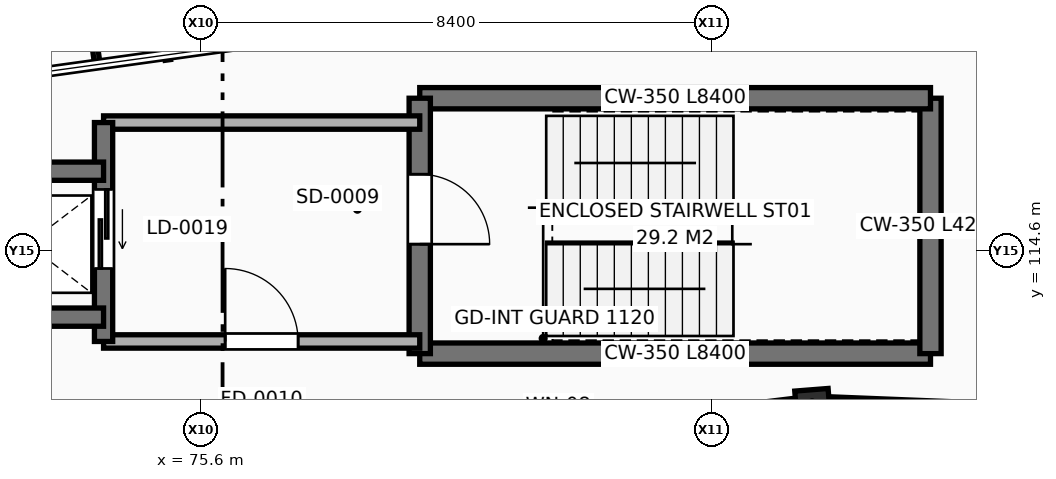
"""IFC4 building model, lengths in metres.
Left out: names, types, materials, properties, quantities, classifications, styles, units other than length and angle.
Written with IfcOpenShell. Run it as: python <this file> out.ifc"""

import sys

from ifc_helpers import new_model, si_unit, direction, frame, frame_2d, origin, origin_2d, place, context, subcontext, project, spatial, rectangle, extrude, element, fill, save


model = new_model("IFC4")
c1 = context("Model", 3, precision=1e-05, world=origin(), true_north=direction((0.0, 1.0)))
c2 = subcontext(c1, "Body", "Model", "MODEL_VIEW")
j1 = project(units=[si_unit("LENGTHUNIT", "METRE"), si_unit("PLANEANGLEUNIT", "RADIAN")], contexts=[c1])
p1 = place(None, origin())
s1 = spatial("IfcSite", under=j1, at=p1, CompositionType="ELEMENT")
p2 = place(p1, origin())
s2 = spatial("IfcBuilding", under=s1, at=p2, CompositionType="ELEMENT")
p3 = place(p2, frame((0.0, 0.0, 18.0)))
s3 = spatial("IfcBuildingStorey", under=s2, at=p3, CompositionType="ELEMENT", Elevation=18.0)
p4 = place(p3, frame((85.664, 112.031, 0.0), z_axis=(0.0, 0.0, 1.0), x_axis=(-0.078459095728, 0.996917333733, 0.0)))
e1 = element("IfcColumn", 1, at=p4, inside=s3, PredefinedType="COLUMN", context=c2, shape_type="SweptSolid", body=[
    extrude(rectangle(XDim=0.55, YDim=0.55, at=origin_2d()), origin(), (0.0, 0.0, 1.0), 4.2),
])
p5 = place(p3, frame((99.0, 111.497, 0.0), z_axis=(0.0, 0.0, 1.0), x_axis=(-0.999197725269, 0.040048792968, 0.0)))
e2 = element("IfcWall", 2, at=p5, inside=s3, PredefinedType="SOLIDWALL", context=c2, shape_type="SweptSolid", body=[
    extrude(rectangle(XDim=13.04, YDim=0.34, at=frame_2d((6.52, 0.0))), origin(), (0.0, 0.0, 1.0), 3.387),
])
p6 = place(p5, frame((2.88, 0.0, 0.9)))
e3 = element("IfcOpeningElement", 3, at=p6, cuts=e2, PredefinedType="OPENING", context=c2, shape_type="SweptSolid", body=[
    extrude(rectangle(XDim=2.2, YDim=2.1, at=frame_2d((1.1, 1.05))), frame((0.0, 0.18, 0.0), z_axis=(0.0, -1.0, 0.0), x_axis=(1.0, 0.0, 0.0)), (0.0, 0.0, 1.0), 0.36),
])
p7 = place(p5, frame((7.96, 0.0, 0.9)))
e4 = element("IfcOpeningElement", 4, at=p7, cuts=e2, PredefinedType="OPENING", context=c2, shape_type="SweptSolid", body=[
    extrude(rectangle(XDim=2.2, YDim=2.1, at=frame_2d((1.1, 1.05))), frame((0.0, 0.18, 0.0), z_axis=(0.0, -1.0, 0.0), x_axis=(1.0, 0.0, 0.0)), (0.0, 0.0, 1.0), 0.36),
])
p8 = place(p3, frame((85.377, 111.996, 0.0), z_axis=(0.0, 0.0, 1.0), x_axis=(-0.992611500808, -0.12133593229, 0.0)))
e5 = element("IfcWall", 5, at=p8, inside=s3, PredefinedType="SOLIDWALL", context=c2, shape_type="SweptSolid", body=[
    extrude(rectangle(XDim=12.795, YDim=0.34, at=frame_2d((6.397, 0.0))), origin(), (0.0, 0.0, 1.0), 3.387),
])
p9 = place(p8, frame((2.665, 0.0, 0.9)))
e6 = element("IfcOpeningElement", 6, at=p9, cuts=e5, PredefinedType="OPENING", context=c2, shape_type="SweptSolid", body=[
    extrude(rectangle(XDim=2.4, YDim=2.1, at=frame_2d((1.2, 1.05))), frame((0.0, 0.18, 0.0), z_axis=(0.0, -1.0, 0.0), x_axis=(1.0, 0.0, 0.0)), (0.0, 0.0, 1.0), 0.36),
])
p10 = place(p8, frame((7.73, 0.0, 0.9)))
e7 = element("IfcOpeningElement", 7, at=p10, cuts=e5, PredefinedType="OPENING", context=c2, shape_type="SweptSolid", body=[
    extrude(rectangle(XDim=2.4, YDim=2.1, at=frame_2d((1.2, 1.05))), frame((0.0, 0.18, 0.0), z_axis=(0.0, -1.0, 0.0), x_axis=(1.0, 0.0, 0.0)), (0.0, 0.0, 1.0), 0.36),
])
p11 = place(p3, frame((79.2, 112.9, 0.0), z_axis=(0.0, 0.0, 1.0), x_axis=(1.0, 0.0, 0.0)))
e8 = element("IfcWall", 8, at=p11, inside=s3, PredefinedType="SHEAR", context=c2, shape_type="SweptSolid", body=[
    extrude(rectangle(XDim=8.4, YDim=0.35, at=frame_2d((4.2, 0.0))), origin(), (0.0, 0.0, 1.0), 3.92),
])
p12 = place(p3, frame((87.6, 112.9, 0.0), z_axis=(0.0, 0.0, 1.0), x_axis=(0.0, 1.0, 0.0)))
e9 = element("IfcWall", 9, at=p12, inside=s3, PredefinedType="SHEAR", context=c2, shape_type="SweptSolid", body=[
    extrude(rectangle(XDim=4.2, YDim=0.35, at=frame_2d((2.1, 0.0))), origin(), (0.0, 0.0, 1.0), 3.92),
])
p13 = place(p3, frame((87.6, 117.1, 0.0), z_axis=(0.0, 0.0, 1.0), x_axis=(-1.0, 0.0, 0.0)))
e10 = element("IfcWall", 10, at=p13, inside=s3, PredefinedType="SHEAR", context=c2, shape_type="SweptSolid", body=[
    extrude(rectangle(XDim=8.4, YDim=0.35, at=frame_2d((4.2, 0.0))), origin(), (0.0, 0.0, 1.0), 3.92),
])
p14 = place(p3, frame((79.2, 117.1, 0.0), z_axis=(0.0, 0.0, 1.0), x_axis=(0.0, -1.0, 0.0)))
e11 = element("IfcWall", 11, at=p14, inside=s3, PredefinedType="SHEAR", context=c2, shape_type="SweptSolid", body=[
    extrude(rectangle(XDim=4.2, YDim=0.35, at=frame_2d((2.1, 0.0))), origin(), (0.0, 0.0, 1.0), 3.92),
])
p15 = place(p14, frame((1.25, 0.0, 0.0)))
e12 = element("IfcOpeningElement", 12, at=p15, cuts=e11, PredefinedType="OPENING", context=c2, shape_type="SweptSolid", body=[
    extrude(rectangle(XDim=1.15, YDim=2.2, at=frame_2d((0.575, 1.1))), frame((0.0, 0.185, 0.0), z_axis=(0.0, -1.0, 0.0), x_axis=(1.0, 0.0, 0.0)), (0.0, 0.0, 1.0), 0.37),
])
p16 = place(p3, frame((74.0, 113.1, 0.0), z_axis=(0.0, 0.0, 1.0), x_axis=(1.0, 0.0, 0.0)))
e13 = element("IfcWall", 13, at=p16, inside=s3, PredefinedType="SOLIDWALL", context=c2, shape_type="SweptSolid", body=[
    extrude(rectangle(XDim=5.2, YDim=0.22, at=frame_2d((2.6, 0.0))), origin(), (0.0, 0.0, 1.0), 3.92),
])
p17 = place(p16, frame((2.0, 0.0, 0.0)))
e14 = element("IfcOpeningElement", 14, at=p17, cuts=e13, PredefinedType="OPENING", context=c2, shape_type="SweptSolid", body=[
    extrude(rectangle(XDim=1.2, YDim=2.2, at=frame_2d((0.6, 1.1))), frame((0.0, 0.12, 0.0), z_axis=(0.0, -1.0, 0.0), x_axis=(1.0, 0.0, 0.0)), (0.0, 0.0, 1.0), 0.24),
])
p18 = place(p3, frame((79.2, 116.7, 0.0), z_axis=(0.0, 0.0, 1.0), x_axis=(-1.0, 0.0, 0.0)))
e15 = element("IfcWall", 15, at=p18, inside=s3, PredefinedType="SOLIDWALL", context=c2, shape_type="SweptSolid", body=[
    extrude(rectangle(XDim=5.2, YDim=0.22, at=frame_2d((2.6, 0.0))), origin(), (0.0, 0.0, 1.0), 3.92),
])
p19 = place(p3, frame((74.0, 116.7, 0.0), z_axis=(0.0, 0.0, 1.0), x_axis=(0.0, -1.0, 0.0)))
e16 = element("IfcWall", 16, at=p19, inside=s3, PredefinedType="SHEAR", context=c2, shape_type="SweptSolid", body=[
    extrude(rectangle(XDim=3.6, YDim=0.3, at=frame_2d((1.8, 0.0))), origin(), (0.0, 0.0, 1.0), 3.92),
])
p20 = place(p19, frame((1.1, 0.0, 0.0)))
e17 = element("IfcOpeningElement", 17, at=p20, cuts=e16, PredefinedType="OPENING", context=c2, shape_type="SweptSolid", body=[
    extrude(rectangle(XDim=1.3, YDim=2.3, at=frame_2d((0.65, 1.15))), frame((0.0, 0.16, 0.0), z_axis=(0.0, -1.0, 0.0), x_axis=(1.0, 0.0, 0.0)), (0.0, 0.0, 1.0), 0.32),
])
for number, where, z_axis, x_axis in (
    (18, (74.0, 115.9, 0.0), (0.0, 0.0, 1.0), (-1.0, 0.0, 0.0)),
    (19, (71.5, 113.5, 0.0), (0.0, 0.0, 1.0), (1.0, 0.0, 0.0)),
):
    element("IfcWall", number, at=place(p3, frame(where, z_axis=z_axis, x_axis=x_axis)), inside=s3, PredefinedType="SHEAR", context=c2, shape_type="SweptSolid", body=[
        extrude(rectangle(XDim=2.5, YDim=0.3, at=frame_2d((1.25, 0.0))), origin(), (0.0, 0.0, 1.0), 3.92),
    ])
p21 = place(p15, origin())
e20 = element("IfcDoor", 20, at=p21, inside=s3, OperationType="SINGLE_SWING_RIGHT", PredefinedType="DOOR", context=c2, shape_type="SweptSolid", body=[
    extrude(rectangle(XDim=1.15, YDim=2.2, at=frame_2d((0.575, 1.1))), frame((0.0, 0.025, 0.0), z_axis=(0.0, -1.0, 0.0), x_axis=(1.0, 0.0, 0.0)), (0.0, 0.0, 1.0), 0.05),
])
fill(e12, e20)
p22 = place(p17, origin())
e21 = element("IfcDoor", 21, at=p22, inside=s3, OperationType="SINGLE_SWING_LEFT", PredefinedType="DOOR", context=c2, shape_type="SweptSolid", body=[
    extrude(rectangle(XDim=1.2, YDim=2.2, at=frame_2d((0.6, 1.1))), frame((0.0, 0.025, 0.0), z_axis=(0.0, -1.0, 0.0), x_axis=(1.0, 0.0, 0.0)), (0.0, 0.0, 1.0), 0.05),
])
fill(e14, e21)
p23 = place(p20, origin())
e22 = element("IfcDoor", 22, at=p23, inside=s3, OperationType="SLIDING_TO_LEFT", PredefinedType="DOOR", context=c2, shape_type="SweptSolid", body=[
    extrude(rectangle(XDim=1.3, YDim=2.3, at=frame_2d((0.65, 1.15))), frame((0.0, 0.025, 0.0), z_axis=(0.0, -1.0, 0.0), x_axis=(1.0, 0.0, 0.0)), (0.0, 0.0, 1.0), 0.05),
])
fill(e17, e22)
save(model, sys.argv[1])
